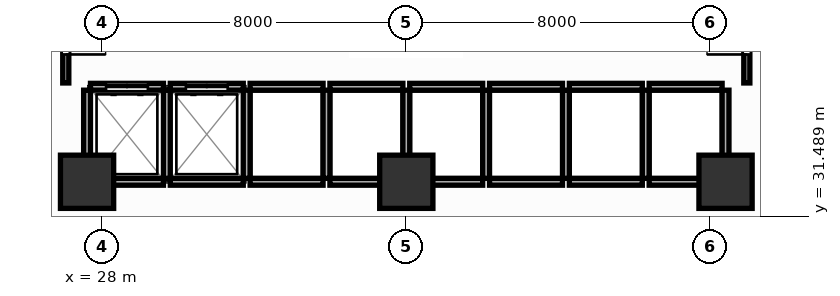
"""IFC4 building model, lengths in metres.
Left out: names, types, materials, properties, quantities, classifications, styles, units other than length and angle.
Written with IfcOpenShell. Run it as: python <this file> out.ifc"""

import sys

from ifc_helpers import new_model, si_unit, direction, frame, frame_2d, origin, origin_2d, place, context, subcontext, project, spatial, rectangle, extrude, source, transform, mapped, element, fill, save


model = new_model("IFC4")
c1 = context("Model", 3, precision=1e-05, world=origin(), true_north=direction((0.0, 1.0)))
c2 = subcontext(c1, "Body", "Model", "MODEL_VIEW")
j1 = project(units=[si_unit("LENGTHUNIT", "METRE"), si_unit("PLANEANGLEUNIT", "RADIAN")], contexts=[c1])
p1 = place(None, origin())
s1 = spatial("IfcSite", under=j1, at=p1, CompositionType="ELEMENT")
p2 = place(p1, origin())
s2 = spatial("IfcBuilding", under=s1, at=p2, CompositionType="ELEMENT")
p3 = place(p2, frame((0.0, 0.0, 19.2)))
s3 = spatial("IfcBuildingStorey", under=s2, at=p3, CompositionType="ELEMENT", Elevation=19.2)
m1 = source(origin(), c2, "Body", "SweptSolid", [
    extrude(rectangle(XDim=1.4, YDim=1.4, at=origin_2d()), origin(), (0.0, 0.0, 1.0), 4.8),
])
for number, where, z_axis, x_axis in (
    (1, (27.6, 32.4, 0.0), (0.0, 0.0, 1.0), (1.0, 0.0, 0.0)),
    (2, (44.4, 32.4, 0.0), (0.0, 0.0, 1.0), (1.0, 0.0, 0.0)),
    (3, (36.0, 32.4, 0.0), (0.0, 0.0, 1.0), (1.0, 0.0, 0.0)),
):
    element("IfcColumn", number, at=place(p3, frame(where, z_axis=z_axis, x_axis=x_axis)), inside=s3, PredefinedType="COLUMN", context=c2, shape_type="MappedRepresentation", body=[
        mapped(m1, transform((0.0, 0.0, 0.0), scale=1.0)),
    ])
p4 = place(p3, frame((27.69, 34.9, 0.0), z_axis=(0.0, 0.0, 1.0), x_axis=(1.0, 0.0, 0.0)))
e4 = element("IfcWall", 4, at=p4, inside=s3, PredefinedType="PARTITIONING", context=c2, shape_type="SweptSolid", body=[
    extrude(rectangle(XDim=1.92, YDim=0.18, at=frame_2d((0.96, 0.0))), origin(), (0.0, 0.0, 1.0), 4.58),
])
p5 = place(p4, frame((0.41, 0.0, 0.0)))
e5 = element("IfcOpeningElement", 5, at=p5, cuts=e4, PredefinedType="OPENING", context=c2, shape_type="SweptSolid", body=[
    extrude(rectangle(XDim=1.1, YDim=2.1, at=frame_2d((0.55, 1.05))), frame((0.0, 0.1, 0.0), z_axis=(0.0, -1.0, 0.0), x_axis=(1.0, 0.0, 0.0)), (0.0, 0.0, 1.0), 0.2),
])
p6 = place(p3, frame((27.69, 32.4, 0.0), z_axis=(0.0, 0.0, 1.0), x_axis=(1.0, 0.0, 0.0)))
e6 = element("IfcWall", 6, at=p6, inside=s3, PredefinedType="PARTITIONING", context=c2, shape_type="SweptSolid", body=[
    extrude(rectangle(XDim=1.92, YDim=0.18, at=frame_2d((0.96, 0.0))), origin(), (0.0, 0.0, 1.0), 3.88),
])
p7 = place(p3, frame((27.6, 32.49, 0.0), z_axis=(0.0, 0.0, 1.0), x_axis=(0.0, 1.0, 0.0)))
e7 = element("IfcWall", 7, at=p7, inside=s3, PredefinedType="PARTITIONING", context=c2, shape_type="SweptSolid", body=[
    extrude(rectangle(XDim=2.32, YDim=0.18, at=frame_2d((1.16, 0.0))), origin(), (0.0, 0.0, 1.0), 4.58),
])
p8 = place(p3, frame((29.79, 34.9, 0.0), z_axis=(0.0, 0.0, 1.0), x_axis=(1.0, 0.0, 0.0)))
e8 = element("IfcWall", 8, at=p8, inside=s3, PredefinedType="PARTITIONING", context=c2, shape_type="SweptSolid", body=[
    extrude(rectangle(XDim=1.92, YDim=0.18, at=frame_2d((0.96, 0.0))), origin(), (0.0, 0.0, 1.0), 4.58),
])
p9 = place(p8, frame((0.41, 0.0, 0.0)))
e9 = element("IfcOpeningElement", 9, at=p9, cuts=e8, PredefinedType="OPENING", context=c2, shape_type="SweptSolid", body=[
    extrude(rectangle(XDim=1.1, YDim=2.1, at=frame_2d((0.55, 1.05))), frame((0.0, 0.1, 0.0), z_axis=(0.0, -1.0, 0.0), x_axis=(1.0, 0.0, 0.0)), (0.0, 0.0, 1.0), 0.2),
])
p10 = place(p3, frame((29.79, 32.4, 0.0), z_axis=(0.0, 0.0, 1.0), x_axis=(1.0, 0.0, 0.0)))
e10 = element("IfcWall", 10, at=p10, inside=s3, PredefinedType="PARTITIONING", context=c2, shape_type="SweptSolid", body=[
    extrude(rectangle(XDim=1.92, YDim=0.18, at=frame_2d((0.96, 0.0))), origin(), (0.0, 0.0, 1.0), 3.88),
])
p11 = place(p3, frame((29.7, 32.49, 0.0), z_axis=(0.0, 0.0, 1.0), x_axis=(0.0, 1.0, 0.0)))
e11 = element("IfcWall", 11, at=p11, inside=s3, PredefinedType="PARTITIONING", context=c2, shape_type="SweptSolid", body=[
    extrude(rectangle(XDim=2.32, YDim=0.18, at=frame_2d((1.16, 0.0))), origin(), (0.0, 0.0, 1.0), 4.58),
])
p12 = place(p3, frame((31.89, 34.9, 0.0), z_axis=(0.0, 0.0, 1.0), x_axis=(1.0, 0.0, 0.0)))
e12 = element("IfcWall", 12, at=p12, inside=s3, PredefinedType="PARTITIONING", context=c2, shape_type="SweptSolid", body=[
    extrude(rectangle(XDim=1.92, YDim=0.18, at=frame_2d((0.96, 0.0))), origin(), (0.0, 0.0, 1.0), 4.58),
])
p13 = place(p3, frame((31.89, 32.4, 0.0), z_axis=(0.0, 0.0, 1.0), x_axis=(1.0, 0.0, 0.0)))
e13 = element("IfcWall", 13, at=p13, inside=s3, PredefinedType="PARTITIONING", context=c2, shape_type="SweptSolid", body=[
    extrude(rectangle(XDim=1.92, YDim=0.18, at=frame_2d((0.96, 0.0))), origin(), (0.0, 0.0, 1.0), 3.88),
])
p14 = place(p3, frame((31.8, 32.49, 0.0), z_axis=(0.0, 0.0, 1.0), x_axis=(0.0, 1.0, 0.0)))
e14 = element("IfcWall", 14, at=p14, inside=s3, PredefinedType="PARTITIONING", context=c2, shape_type="SweptSolid", body=[
    extrude(rectangle(XDim=2.32, YDim=0.18, at=frame_2d((1.16, 0.0))), origin(), (0.0, 0.0, 1.0), 4.58),
])
p15 = place(p3, frame((33.99, 34.9, 0.0), z_axis=(0.0, 0.0, 1.0), x_axis=(1.0, 0.0, 0.0)))
e15 = element("IfcWall", 15, at=p15, inside=s3, PredefinedType="PARTITIONING", context=c2, shape_type="SweptSolid", body=[
    extrude(rectangle(XDim=1.92, YDim=0.18, at=frame_2d((0.96, 0.0))), origin(), (0.0, 0.0, 1.0), 4.58),
])
p16 = place(p3, frame((33.99, 32.4, 0.0), z_axis=(0.0, 0.0, 1.0), x_axis=(1.0, 0.0, 0.0)))
e16 = element("IfcWall", 16, at=p16, inside=s3, PredefinedType="PARTITIONING", context=c2, shape_type="SweptSolid", body=[
    extrude(rectangle(XDim=1.92, YDim=0.18, at=frame_2d((0.96, 0.0))), origin(), (0.0, 0.0, 1.0), 3.88),
])
p17 = place(p3, frame((33.9, 32.49, 0.0), z_axis=(0.0, 0.0, 1.0), x_axis=(0.0, 1.0, 0.0)))
e17 = element("IfcWall", 17, at=p17, inside=s3, PredefinedType="PARTITIONING", context=c2, shape_type="SweptSolid", body=[
    extrude(rectangle(XDim=2.32, YDim=0.18, at=frame_2d((1.16, 0.0))), origin(), (0.0, 0.0, 1.0), 4.58),
])
p18 = place(p3, frame((36.09, 34.9, 0.0), z_axis=(0.0, 0.0, 1.0), x_axis=(1.0, 0.0, 0.0)))
e18 = element("IfcWall", 18, at=p18, inside=s3, PredefinedType="PARTITIONING", context=c2, shape_type="SweptSolid", body=[
    extrude(rectangle(XDim=1.92, YDim=0.18, at=frame_2d((0.96, 0.0))), origin(), (0.0, 0.0, 1.0), 4.58),
])
p19 = place(p3, frame((36.09, 32.4, 0.0), z_axis=(0.0, 0.0, 1.0), x_axis=(1.0, 0.0, 0.0)))
e19 = element("IfcWall", 19, at=p19, inside=s3, PredefinedType="PARTITIONING", context=c2, shape_type="SweptSolid", body=[
    extrude(rectangle(XDim=1.92, YDim=0.18, at=frame_2d((0.96, 0.0))), origin(), (0.0, 0.0, 1.0), 3.88),
])
p20 = place(p3, frame((36.0, 32.49, 0.0), z_axis=(0.0, 0.0, 1.0), x_axis=(0.0, 1.0, 0.0)))
e20 = element("IfcWall", 20, at=p20, inside=s3, PredefinedType="PARTITIONING", context=c2, shape_type="SweptSolid", body=[
    extrude(rectangle(XDim=2.32, YDim=0.18, at=frame_2d((1.16, 0.0))), origin(), (0.0, 0.0, 1.0), 4.58),
])
p21 = place(p3, frame((38.19, 34.9, 0.0), z_axis=(0.0, 0.0, 1.0), x_axis=(1.0, 0.0, 0.0)))
e21 = element("IfcWall", 21, at=p21, inside=s3, PredefinedType="PARTITIONING", context=c2, shape_type="SweptSolid", body=[
    extrude(rectangle(XDim=1.92, YDim=0.18, at=frame_2d((0.96, 0.0))), origin(), (0.0, 0.0, 1.0), 4.58),
])
p22 = place(p3, frame((38.19, 32.4, 0.0), z_axis=(0.0, 0.0, 1.0), x_axis=(1.0, 0.0, 0.0)))
e22 = element("IfcWall", 22, at=p22, inside=s3, PredefinedType="PARTITIONING", context=c2, shape_type="SweptSolid", body=[
    extrude(rectangle(XDim=1.92, YDim=0.18, at=frame_2d((0.96, 0.0))), origin(), (0.0, 0.0, 1.0), 3.88),
])
p23 = place(p3, frame((38.1, 32.49, 0.0), z_axis=(0.0, 0.0, 1.0), x_axis=(0.0, 1.0, 0.0)))
e23 = element("IfcWall", 23, at=p23, inside=s3, PredefinedType="PARTITIONING", context=c2, shape_type="SweptSolid", body=[
    extrude(rectangle(XDim=2.32, YDim=0.18, at=frame_2d((1.16, 0.0))), origin(), (0.0, 0.0, 1.0), 4.58),
])
p24 = place(p3, frame((40.29, 34.9, 0.0), z_axis=(0.0, 0.0, 1.0), x_axis=(1.0, 0.0, 0.0)))
e24 = element("IfcWall", 24, at=p24, inside=s3, PredefinedType="PARTITIONING", context=c2, shape_type="SweptSolid", body=[
    extrude(rectangle(XDim=1.92, YDim=0.18, at=frame_2d((0.96, 0.0))), origin(), (0.0, 0.0, 1.0), 4.58),
])
p25 = place(p3, frame((40.29, 32.4, 0.0), z_axis=(0.0, 0.0, 1.0), x_axis=(1.0, 0.0, 0.0)))
e25 = element("IfcWall", 25, at=p25, inside=s3, PredefinedType="PARTITIONING", context=c2, shape_type="SweptSolid", body=[
    extrude(rectangle(XDim=1.92, YDim=0.18, at=frame_2d((0.96, 0.0))), origin(), (0.0, 0.0, 1.0), 3.88),
])
p26 = place(p3, frame((40.2, 32.49, 0.0), z_axis=(0.0, 0.0, 1.0), x_axis=(0.0, 1.0, 0.0)))
e26 = element("IfcWall", 26, at=p26, inside=s3, PredefinedType="PARTITIONING", context=c2, shape_type="SweptSolid", body=[
    extrude(rectangle(XDim=2.32, YDim=0.18, at=frame_2d((1.16, 0.0))), origin(), (0.0, 0.0, 1.0), 4.58),
])
p27 = place(p3, frame((42.39, 34.9, 0.0), z_axis=(0.0, 0.0, 1.0), x_axis=(1.0, 0.0, 0.0)))
e27 = element("IfcWall", 27, at=p27, inside=s3, PredefinedType="PARTITIONING", context=c2, shape_type="SweptSolid", body=[
    extrude(rectangle(XDim=1.92, YDim=0.18, at=frame_2d((0.96, 0.0))), origin(), (0.0, 0.0, 1.0), 4.58),
])
p28 = place(p3, frame((42.39, 32.4, 0.0), z_axis=(0.0, 0.0, 1.0), x_axis=(1.0, 0.0, 0.0)))
e28 = element("IfcWall", 28, at=p28, inside=s3, PredefinedType="PARTITIONING", context=c2, shape_type="SweptSolid", body=[
    extrude(rectangle(XDim=1.92, YDim=0.18, at=frame_2d((0.96, 0.0))), origin(), (0.0, 0.0, 1.0), 3.88),
])
for number, where, z_axis, x_axis in (
    (29, (42.3, 32.49, 0.0), (0.0, 0.0, 1.0), (0.0, 1.0, 0.0)),
    (30, (44.4, 32.49, 0.0), (0.0, 0.0, 1.0), (0.0, 1.0, 0.0)),
):
    element("IfcWall", number, at=place(p3, frame(where, z_axis=z_axis, x_axis=x_axis)), inside=s3, PredefinedType="PARTITIONING", context=c2, shape_type="SweptSolid", body=[
        extrude(rectangle(XDim=2.32, YDim=0.18, at=frame_2d((1.16, 0.0))), origin(), (0.0, 0.0, 1.0), 4.58),
    ])
p29 = place(p3, frame((27.04, 35.0, 0.0), z_axis=(0.0, 0.0, 1.0), x_axis=(0.0, 1.0, 0.0)))
e31 = element("IfcWall", 31, at=p29, inside=s3, PredefinedType="PARTITIONING", context=c2, shape_type="SweptSolid", body=[
    extrude(rectangle(XDim=2.65, YDim=0.16, at=frame_2d((1.325, 0.0))), origin(), (0.0, 0.0, 1.0), 4.58),
])
p30 = place(p29, frame((0.75, 0.0, 0.0)))
e32 = element("IfcOpeningElement", 32, at=p30, cuts=e31, PredefinedType="OPENING", context=c2, shape_type="SweptSolid", body=[
    extrude(rectangle(XDim=1.05, YDim=2.1, at=frame_2d((0.525, 1.05))), frame((0.0, 0.09, 0.0), z_axis=(0.0, -1.0, 0.0), x_axis=(1.0, 0.0, 0.0)), (0.0, 0.0, 1.0), 0.18),
])
p31 = place(p3, frame((44.96, 35.0, 0.0), z_axis=(0.0, 0.0, 1.0), x_axis=(0.0, 1.0, 0.0)))
e33 = element("IfcWall", 33, at=p31, inside=s3, PredefinedType="PARTITIONING", context=c2, shape_type="SweptSolid", body=[
    extrude(rectangle(XDim=2.65, YDim=0.16, at=frame_2d((1.325, 0.0))), origin(), (0.0, 0.0, 1.0), 4.58),
])
p32 = place(p31, frame((0.75, 0.0, 0.0)))
e34 = element("IfcOpeningElement", 34, at=p32, cuts=e33, PredefinedType="OPENING", context=c2, shape_type="SweptSolid", body=[
    extrude(rectangle(XDim=1.05, YDim=2.1, at=frame_2d((0.525, 1.05))), frame((0.0, 0.09, 0.0), z_axis=(0.0, -1.0, 0.0), x_axis=(1.0, 0.0, 0.0)), (0.0, 0.0, 1.0), 0.18),
])
p33 = place(p5, origin())
e35 = element("IfcDoor", 35, at=p33, inside=s3, OperationType="DOUBLE_DOOR_SLIDING", PredefinedType="DOOR", context=c2, shape_type="SweptSolid", body=[
    extrude(rectangle(XDim=1.1, YDim=2.1, at=frame_2d((0.55, 1.05))), frame((0.0, 0.025, 0.0), z_axis=(0.0, -1.0, 0.0), x_axis=(1.0, 0.0, 0.0)), (0.0, 0.0, 1.0), 0.05),
])
fill(e5, e35)
p34 = place(p9, origin())
e36 = element("IfcDoor", 36, at=p34, inside=s3, OperationType="DOUBLE_DOOR_SLIDING", PredefinedType="DOOR", context=c2, shape_type="SweptSolid", body=[
    extrude(rectangle(XDim=1.1, YDim=2.1, at=frame_2d((0.55, 1.05))), frame((0.0, 0.025, 0.0), z_axis=(0.0, -1.0, 0.0), x_axis=(1.0, 0.0, 0.0)), (0.0, 0.0, 1.0), 0.05),
])
fill(e9, e36)
p35 = place(p30, frame((1.05, 0.0, 0.0), z_axis=(0.0, 0.0, 1.0), x_axis=(-1.0, 0.0, 0.0)))
e37 = element("IfcDoor", 37, at=p35, inside=s3, OperationType="SINGLE_SWING_RIGHT", PredefinedType="DOOR", context=c2, shape_type="SweptSolid", body=[
    extrude(rectangle(XDim=1.05, YDim=2.1, at=frame_2d((0.525, 1.05))), frame((0.0, 0.025, 0.0), z_axis=(0.0, -1.0, 0.0), x_axis=(1.0, 0.0, 0.0)), (0.0, 0.0, 1.0), 0.05),
])
fill(e32, e37)
p36 = place(p32, origin())
e38 = element("IfcDoor", 38, at=p36, inside=s3, OperationType="SINGLE_SWING_LEFT", PredefinedType="DOOR", context=c2, shape_type="SweptSolid", body=[
    extrude(rectangle(XDim=1.05, YDim=2.1, at=frame_2d((0.525, 1.05))), frame((0.0, 0.025, 0.0), z_axis=(0.0, -1.0, 0.0), x_axis=(1.0, 0.0, 0.0)), (0.0, 0.0, 1.0), 0.05),
])
fill(e34, e38)
save(model, sys.argv[1])
